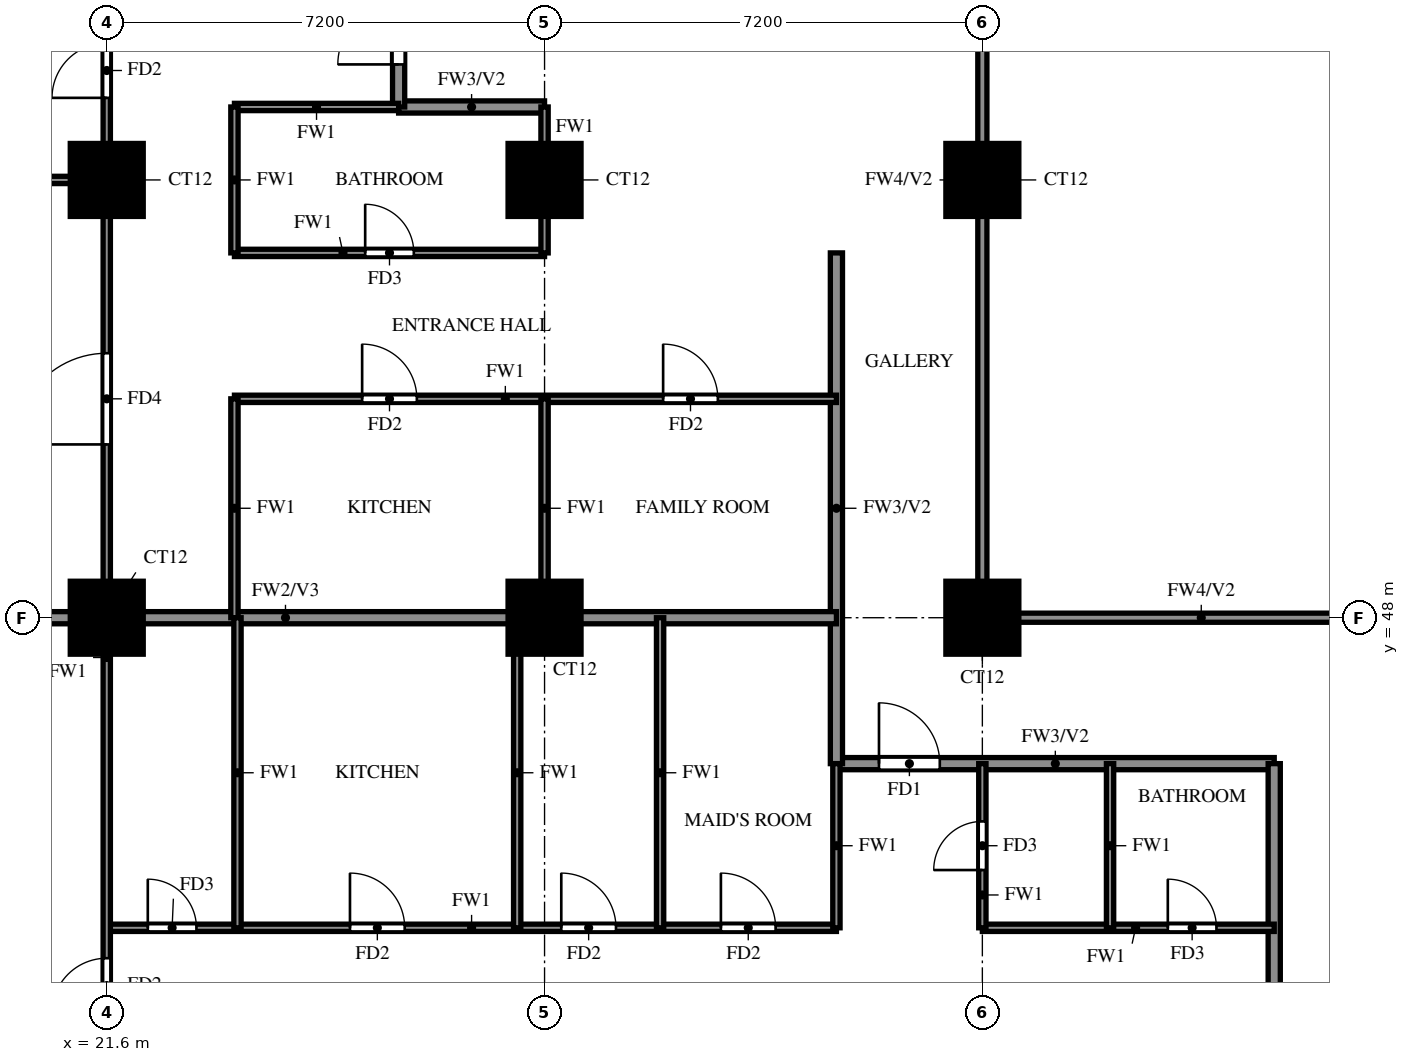
"""IFC4 building model, lengths in metres.
Left out: names, types, materials, properties, quantities, classifications, styles, units other than length and angle.
Written with IfcOpenShell. Run it as: python <this file> out.ifc"""

import sys

from ifc_helpers import new_model, si_unit, direction, frame, frame_2d, origin, origin_2d, place, context, subcontext, project, spatial, rectangle, extrude, source, transform, mapped, element, fill, save


model = new_model("IFC4")
c1 = context("Model", 3, precision=1e-05, world=origin(), true_north=direction((0.0, 1.0)))
c2 = subcontext(c1, "Body", "Model", "MODEL_VIEW")
j1 = project(units=[si_unit("LENGTHUNIT", "METRE"), si_unit("PLANEANGLEUNIT", "RADIAN")], contexts=[c1])
p1 = place(None, origin())
s1 = spatial("IfcSite", under=j1, at=p1, CompositionType="ELEMENT")
p2 = place(p1, origin())
s2 = spatial("IfcBuilding", under=s1, at=p2, CompositionType="ELEMENT")
p3 = place(p2, frame((0.0, 0.0, 97.0)))
s3 = spatial("IfcBuildingStorey", under=s2, at=p3, CompositionType="ELEMENT", Elevation=97.0)
m1 = source(origin(), c2, "Body", "SweptSolid", [
    extrude(rectangle(XDim=1.2, YDim=1.2, at=origin_2d()), origin(), (0.0, 0.0, 1.0), 3.18),
])
for number, where, z_axis, x_axis in (
    (1, (21.6, 48.0, 0.0), (0.0, 0.0, 1.0), (1.0, 0.0, 0.0)),
    (2, (28.8, 48.0, 0.0), (0.0, 0.0, 1.0), (1.0, 0.0, 0.0)),
    (3, (36.0, 48.0, 0.0), (0.0, 0.0, 1.0), (1.0, 0.0, 0.0)),
    (4, (21.6, 55.2, 0.0), (0.0, 0.0, 1.0), (1.0, 0.0, 0.0)),
    (5, (28.8, 55.2, 0.0), (0.0, 0.0, 1.0), (1.0, 0.0, 0.0)),
    (6, (36.0, 55.2, 0.0), (0.0, 0.0, 1.0), (1.0, 0.0, 0.0)),
):
    element("IfcColumn", number, at=place(p3, frame(where, z_axis=z_axis, x_axis=x_axis)), inside=s3, PredefinedType="COLUMN", context=c2, shape_type="MappedRepresentation", body=[
        mapped(m1, transform((0.0, 0.0, 0.0))),
    ])
p4 = place(p3, frame((33.6, 45.6, 0.0), z_axis=(0.0, 0.0, 1.0), x_axis=(1.0, 0.0, 0.0)))
e7 = element("IfcWall", 7, at=p4, inside=s3, PredefinedType="SOLIDWALL", context=c2, shape_type="SweptSolid", body=[
    extrude(rectangle(XDim=7.2, YDim=0.2, at=frame_2d((3.6, 0.0))), origin(), (0.0, 0.0, 1.0), 3.18),
])
p5 = place(p4, frame((0.7, 0.0, 0.0)))
e8 = element("IfcOpeningElement", 8, at=p5, cuts=e7, PredefinedType="OPENING", context=c2, shape_type="SweptSolid", body=[
    extrude(rectangle(XDim=1.0, YDim=2.1, at=frame_2d((0.5, 1.05))), frame((0.0, 0.11, 0.0), z_axis=(0.0, -1.0, 0.0), x_axis=(1.0, 0.0, 0.0)), (0.0, 0.0, 1.0), 0.22),
])
p6 = place(p3, frame((26.4, 56.4, 0.0), z_axis=(0.0, 0.0, 1.0), x_axis=(1.0, 0.0, 0.0)))
e9 = element("IfcWall", 9, at=p6, inside=s3, PredefinedType="SOLIDWALL", context=c2, shape_type="SweptSolid", body=[
    extrude(rectangle(XDim=2.4, YDim=0.2, at=frame_2d((1.2, 0.0))), origin(), (0.0, 0.0, 1.0), 3.18),
])
p7 = place(p3, frame((26.4, 56.4, 0.0), z_axis=(0.0, 0.0, 1.0), x_axis=(0.0, 1.0, 0.0)))
e10 = element("IfcWall", 10, at=p7, inside=s3, PredefinedType="SOLIDWALL", context=c2, shape_type="SweptSolid", body=[
    extrude(rectangle(XDim=9.6, YDim=0.2, at=frame_2d((4.8, 0.0))), origin(), (0.0, 0.0, 1.0), 3.18),
])
p8 = place(p7, frame((0.7, 0.0, 0.0)))
e11 = element("IfcOpeningElement", 11, at=p8, cuts=e10, PredefinedType="OPENING", context=c2, shape_type="SweptSolid", body=[
    extrude(rectangle(XDim=1.0, YDim=2.1, at=frame_2d((0.5, 1.05))), frame((0.0, 0.11, 0.0), z_axis=(0.0, -1.0, 0.0), x_axis=(1.0, 0.0, 0.0)), (0.0, 0.0, 1.0), 0.22),
])
p9 = place(p7, frame((3.1, 0.0, 0.0)))
e12 = element("IfcOpeningElement", 12, at=p9, cuts=e10, PredefinedType="OPENING", context=c2, shape_type="SweptSolid", body=[
    extrude(rectangle(XDim=1.0, YDim=2.1, at=frame_2d((0.5, 1.05))), frame((0.0, 0.11, 0.0), z_axis=(0.0, -1.0, 0.0), x_axis=(1.0, 0.0, 0.0)), (0.0, 0.0, 1.0), 0.22),
])
p10 = place(p3, frame((33.6, 45.6, 0.0), z_axis=(0.0, 0.0, 1.0), x_axis=(0.0, 1.0, 0.0)))
e13 = element("IfcWall", 13, at=p10, inside=s3, PredefinedType="SOLIDWALL", context=c2, shape_type="SweptSolid", body=[
    extrude(rectangle(XDim=8.4, YDim=0.2, at=frame_2d((4.2, 0.0))), origin(), (0.0, 0.0, 1.0), 3.18),
])
p11 = place(p3, frame((40.8, 33.725, 0.0), z_axis=(0.0, 0.0, 1.0), x_axis=(0.0, 1.0, 0.0)))
e14 = element("IfcWall", 14, at=p11, inside=s3, PredefinedType="SOLIDWALL", context=c2, shape_type="SweptSolid", body=[
    extrude(rectangle(XDim=11.875, YDim=0.2, at=frame_2d((5.938, 0.0))), origin(), (0.0, 0.0, 1.0), 2.28),
])
p12 = place(p3, frame((14.525, 48.0, 0.0), z_axis=(0.0, 0.0, 1.0), x_axis=(1.0, 0.0, 0.0)))
e15 = element("IfcWall", 15, at=p12, inside=s3, PredefinedType="SOLIDWALL", context=c2, shape_type="SweptSolid", body=[
    extrude(rectangle(XDim=19.075, YDim=0.2, at=frame_2d((9.538, 0.0))), origin(), (0.0, 0.0, 1.0), 3.18),
])
p13 = place(p3, frame((21.6, 42.9, 0.0), z_axis=(0.0, 0.0, 1.0), x_axis=(1.0, 0.0, 0.0)))
e16 = element("IfcWall", 16, at=p13, inside=s3, PredefinedType="PARTITIONING", context=c2, shape_type="SweptSolid", body=[
    extrude(rectangle(XDim=12.0, YDim=0.12, at=frame_2d((6.0, 0.0))), origin(), (0.0, 0.0, 1.0), 3.18),
])
p14 = place(p13, frame((0.675, 0.0, 0.0)))
e17 = element("IfcOpeningElement", 17, at=p14, cuts=e16, PredefinedType="OPENING", context=c2, shape_type="SweptSolid", body=[
    extrude(rectangle(XDim=0.8, YDim=2.1, at=frame_2d((0.4, 1.05))), frame((0.0, 0.07, 0.0), z_axis=(0.0, -1.0, 0.0), x_axis=(1.0, 0.0, 0.0)), (0.0, 0.0, 1.0), 0.14),
])
p15 = place(p13, frame((4.0, 0.0, 0.0)))
e18 = element("IfcOpeningElement", 18, at=p15, cuts=e16, PredefinedType="OPENING", context=c2, shape_type="SweptSolid", body=[
    extrude(rectangle(XDim=0.9, YDim=2.1, at=frame_2d((0.45, 1.05))), frame((0.0, 0.07, 0.0), z_axis=(0.0, -1.0, 0.0), x_axis=(1.0, 0.0, 0.0)), (0.0, 0.0, 1.0), 0.14),
])
p16 = place(p13, frame((7.475, 0.0, 0.0)))
e19 = element("IfcOpeningElement", 19, at=p16, cuts=e16, PredefinedType="OPENING", context=c2, shape_type="SweptSolid", body=[
    extrude(rectangle(XDim=0.9, YDim=2.1, at=frame_2d((0.45, 1.05))), frame((0.0, 0.07, 0.0), z_axis=(0.0, -1.0, 0.0), x_axis=(1.0, 0.0, 0.0)), (0.0, 0.0, 1.0), 0.14),
])
p17 = place(p13, frame((10.1, 0.0, 0.0)))
e20 = element("IfcOpeningElement", 20, at=p17, cuts=e16, PredefinedType="OPENING", context=c2, shape_type="SweptSolid", body=[
    extrude(rectangle(XDim=0.9, YDim=2.1, at=frame_2d((0.45, 1.05))), frame((0.0, 0.07, 0.0), z_axis=(0.0, -1.0, 0.0), x_axis=(1.0, 0.0, 0.0)), (0.0, 0.0, 1.0), 0.14),
])
p18 = place(p3, frame((36.0, 42.9, 0.0), z_axis=(0.0, 0.0, 1.0), x_axis=(1.0, 0.0, 0.0)))
e21 = element("IfcWall", 21, at=p18, inside=s3, PredefinedType="PARTITIONING", context=c2, shape_type="SweptSolid", body=[
    extrude(rectangle(XDim=4.8, YDim=0.12, at=frame_2d((2.4, 0.0))), origin(), (0.0, 0.0, 1.0), 3.18),
])
p19 = place(p18, frame((3.05, 0.0, 0.0)))
e22 = element("IfcOpeningElement", 22, at=p19, cuts=e21, PredefinedType="OPENING", context=c2, shape_type="SweptSolid", body=[
    extrude(rectangle(XDim=0.8, YDim=2.1, at=frame_2d((0.4, 1.05))), frame((0.0, 0.07, 0.0), z_axis=(0.0, -1.0, 0.0), x_axis=(1.0, 0.0, 0.0)), (0.0, 0.0, 1.0), 0.14),
])
p20 = place(p3, frame((23.7, 51.6, 0.0), z_axis=(0.0, 0.0, 1.0), x_axis=(1.0, 0.0, 0.0)))
e23 = element("IfcWall", 23, at=p20, inside=s3, PredefinedType="PARTITIONING", context=c2, shape_type="SweptSolid", body=[
    extrude(rectangle(XDim=9.9, YDim=0.12, at=frame_2d((4.95, 0.0))), origin(), (0.0, 0.0, 1.0), 3.18),
])
p21 = place(p20, frame((2.1, 0.0, 0.0)))
e24 = element("IfcOpeningElement", 24, at=p21, cuts=e23, PredefinedType="OPENING", context=c2, shape_type="SweptSolid", body=[
    extrude(rectangle(XDim=0.9, YDim=2.1, at=frame_2d((0.45, 1.05))), frame((0.0, 0.07, 0.0), z_axis=(0.0, -1.0, 0.0), x_axis=(1.0, 0.0, 0.0)), (0.0, 0.0, 1.0), 0.14),
])
p22 = place(p20, frame((7.05, 0.0, 0.0)))
e25 = element("IfcOpeningElement", 25, at=p22, cuts=e23, PredefinedType="OPENING", context=c2, shape_type="SweptSolid", body=[
    extrude(rectangle(XDim=0.9, YDim=2.1, at=frame_2d((0.45, 1.05))), frame((0.0, 0.07, 0.0), z_axis=(0.0, -1.0, 0.0), x_axis=(1.0, 0.0, 0.0)), (0.0, 0.0, 1.0), 0.14),
])
p23 = place(p3, frame((23.7, 54.0, 0.0), z_axis=(0.0, 0.0, 1.0), x_axis=(1.0, 0.0, 0.0)))
e26 = element("IfcWall", 26, at=p23, inside=s3, PredefinedType="PARTITIONING", context=c2, shape_type="SweptSolid", body=[
    extrude(rectangle(XDim=5.1, YDim=0.12, at=frame_2d((2.55, 0.0))), origin(), (0.0, 0.0, 1.0), 3.18),
])
p24 = place(p23, frame((2.15, 0.0, 0.0)))
e27 = element("IfcOpeningElement", 27, at=p24, cuts=e26, PredefinedType="OPENING", context=c2, shape_type="SweptSolid", body=[
    extrude(rectangle(XDim=0.8, YDim=2.1, at=frame_2d((0.4, 1.05))), frame((0.0, 0.07, 0.0), z_axis=(0.0, -1.0, 0.0), x_axis=(1.0, 0.0, 0.0)), (0.0, 0.0, 1.0), 0.14),
])
p25 = place(p3, frame((14.525, 55.2, 0.0), z_axis=(0.0, 0.0, 1.0), x_axis=(1.0, 0.0, 0.0)))
e28 = element("IfcWall", 28, at=p25, inside=s3, PredefinedType="PARTITIONING", context=c2, shape_type="SweptSolid", body=[
    extrude(rectangle(XDim=7.075, YDim=0.12, at=frame_2d((3.538, 0.0))), origin(), (0.0, 0.0, 1.0), 3.18),
])
p26 = place(p3, frame((23.7, 56.4, 0.0), z_axis=(0.0, 0.0, 1.0), x_axis=(1.0, 0.0, 0.0)))
e29 = element("IfcWall", 29, at=p26, inside=s3, PredefinedType="PARTITIONING", context=c2, shape_type="SweptSolid", body=[
    extrude(rectangle(XDim=2.7, YDim=0.12, at=frame_2d((1.35, 0.0))), origin(), (0.0, 0.0, 1.0), 3.18),
])
p27 = place(p3, frame((21.6, 33.725, 0.0), z_axis=(0.0, 0.0, 1.0), x_axis=(0.0, 1.0, 0.0)))
e30 = element("IfcWall", 30, at=p27, inside=s3, PredefinedType="PARTITIONING", context=c2, shape_type="SweptSolid", body=[
    extrude(rectangle(XDim=28.675, YDim=0.12, at=frame_2d((14.337, 0.0))), origin(), (0.0, 0.0, 1.0), 3.18),
])
p28 = place(p27, frame((7.775, 0.0, 0.0)))
e31 = element("IfcOpeningElement", 31, at=p28, cuts=e30, PredefinedType="OPENING", context=c2, shape_type="SweptSolid", body=[
    extrude(rectangle(XDim=0.9, YDim=2.1, at=frame_2d((0.45, 1.05))), frame((0.0, 0.07, 0.0), z_axis=(0.0, -1.0, 0.0), x_axis=(1.0, 0.0, 0.0)), (0.0, 0.0, 1.0), 0.14),
])
p29 = place(p27, frame((17.125, 0.0, 0.0)))
e32 = element("IfcOpeningElement", 32, at=p29, cuts=e30, PredefinedType="OPENING", context=c2, shape_type="SweptSolid", body=[
    extrude(rectangle(XDim=1.5, YDim=2.1, at=frame_2d((0.75, 1.05))), frame((0.0, 0.07, 0.0), z_axis=(0.0, -1.0, 0.0), x_axis=(1.0, 0.0, 0.0)), (0.0, 0.0, 1.0), 0.14),
])
p30 = place(p27, frame((22.825, 0.0, 0.0)))
e33 = element("IfcOpeningElement", 33, at=p30, cuts=e30, PredefinedType="OPENING", context=c2, shape_type="SweptSolid", body=[
    extrude(rectangle(XDim=0.9, YDim=2.1, at=frame_2d((0.45, 1.05))), frame((0.0, 0.07, 0.0), z_axis=(0.0, -1.0, 0.0), x_axis=(1.0, 0.0, 0.0)), (0.0, 0.0, 1.0), 0.14),
])
p31 = place(p27, frame((26.425, 0.0, 0.0)))
e34 = element("IfcOpeningElement", 34, at=p31, cuts=e30, PredefinedType="OPENING", context=c2, shape_type="SweptSolid", body=[
    extrude(rectangle(XDim=0.9, YDim=2.1, at=frame_2d((0.45, 1.05))), frame((0.0, 0.07, 0.0), z_axis=(0.0, -1.0, 0.0), x_axis=(1.0, 0.0, 0.0)), (0.0, 0.0, 1.0), 0.14),
])
p32 = place(p3, frame((23.7, 48.0, 0.0), z_axis=(0.0, 0.0, 1.0), x_axis=(0.0, 1.0, 0.0)))
e35 = element("IfcWall", 35, at=p32, inside=s3, PredefinedType="PARTITIONING", context=c2, shape_type="SweptSolid", body=[
    extrude(rectangle(XDim=3.6, YDim=0.12, at=frame_2d((1.8, 0.0))), origin(), (0.0, 0.0, 1.0), 3.18),
])
p33 = place(p3, frame((23.7, 54.0, 0.0), z_axis=(0.0, 0.0, 1.0), x_axis=(0.0, 1.0, 0.0)))
e36 = element("IfcWall", 36, at=p33, inside=s3, PredefinedType="PARTITIONING", context=c2, shape_type="SweptSolid", body=[
    extrude(rectangle(XDim=2.4, YDim=0.12, at=frame_2d((1.2, 0.0))), origin(), (0.0, 0.0, 1.0), 3.18),
])
for number, where, z_axis, x_axis in (
    (37, (23.75, 42.9, 0.0), (0.0, 0.0, 1.0), (0.0, 1.0, 0.0)),
    (38, (28.35, 42.9, 0.0), (0.0, 0.0, 1.0), (0.0, 1.0, 0.0)),
):
    element("IfcWall", number, at=place(p3, frame(where, z_axis=z_axis, x_axis=x_axis)), inside=s3, PredefinedType="PARTITIONING", context=c2, shape_type="SweptSolid", body=[
        extrude(rectangle(XDim=5.1, YDim=0.12, at=frame_2d((2.55, 0.0))), origin(), (0.0, 0.0, 1.0), 3.18),
    ])
p34 = place(p3, frame((28.8, 48.0, 0.0), z_axis=(0.0, 0.0, 1.0), x_axis=(0.0, 1.0, 0.0)))
e39 = element("IfcWall", 39, at=p34, inside=s3, PredefinedType="PARTITIONING", context=c2, shape_type="SweptSolid", body=[
    extrude(rectangle(XDim=3.6, YDim=0.12, at=frame_2d((1.8, 0.0))), origin(), (0.0, 0.0, 1.0), 3.18),
])
p35 = place(p3, frame((28.8, 54.0, 0.0), z_axis=(0.0, 0.0, 1.0), x_axis=(0.0, 1.0, 0.0)))
e40 = element("IfcWall", 40, at=p35, inside=s3, PredefinedType="PARTITIONING", context=c2, shape_type="SweptSolid", body=[
    extrude(rectangle(XDim=2.4, YDim=0.12, at=frame_2d((1.2, 0.0))), origin(), (0.0, 0.0, 1.0), 3.18),
])
p36 = place(p3, frame((30.7, 42.9, 0.0), z_axis=(0.0, 0.0, 1.0), x_axis=(0.0, 1.0, 0.0)))
e41 = element("IfcWall", 41, at=p36, inside=s3, PredefinedType="PARTITIONING", context=c2, shape_type="SweptSolid", body=[
    extrude(rectangle(XDim=5.1, YDim=0.12, at=frame_2d((2.55, 0.0))), origin(), (0.0, 0.0, 1.0), 3.18),
])
p37 = place(p3, frame((33.6, 42.9, 0.0), z_axis=(0.0, 0.0, 1.0), x_axis=(0.0, 1.0, 0.0)))
e42 = element("IfcWall", 42, at=p37, inside=s3, PredefinedType="PARTITIONING", context=c2, shape_type="SweptSolid", body=[
    extrude(rectangle(XDim=2.7, YDim=0.12, at=frame_2d((1.35, 0.0))), origin(), (0.0, 0.0, 1.0), 3.18),
])
p38 = place(p3, frame((36.0, 42.9, 0.0), z_axis=(0.0, 0.0, 1.0), x_axis=(0.0, 1.0, 0.0)))
e43 = element("IfcWall", 43, at=p38, inside=s3, PredefinedType="PARTITIONING", context=c2, shape_type="SweptSolid", body=[
    extrude(rectangle(XDim=2.7, YDim=0.12, at=frame_2d((1.35, 0.0))), origin(), (0.0, 0.0, 1.0), 3.18),
])
p39 = place(p38, frame((0.95, 0.0, 0.0)))
e44 = element("IfcOpeningElement", 44, at=p39, cuts=e43, PredefinedType="OPENING", context=c2, shape_type="SweptSolid", body=[
    extrude(rectangle(XDim=0.8, YDim=2.1, at=frame_2d((0.4, 1.05))), frame((0.0, 0.07, 0.0), z_axis=(0.0, -1.0, 0.0), x_axis=(1.0, 0.0, 0.0)), (0.0, 0.0, 1.0), 0.14),
])
p40 = place(p3, frame((38.1, 42.9, 0.0), z_axis=(0.0, 0.0, 1.0), x_axis=(0.0, 1.0, 0.0)))
e45 = element("IfcWall", 45, at=p40, inside=s3, PredefinedType="PARTITIONING", context=c2, shape_type="SweptSolid", body=[
    extrude(rectangle(XDim=2.7, YDim=0.12, at=frame_2d((1.35, 0.0))), origin(), (0.0, 0.0, 1.0), 3.18),
])
p41 = place(p3, frame((36.0, 48.0, 0.0), z_axis=(0.0, 0.0, 1.0), x_axis=(1.0, 0.0, 0.0)))
e46 = element("IfcWall", 46, at=p41, inside=s3, PredefinedType="SOLIDWALL", context=c2, shape_type="SweptSolid", body=[
    extrude(rectangle(XDim=7.2, YDim=0.15, at=frame_2d((3.6, 0.0))), origin(), (0.0, 0.0, 1.0), 2.28),
])
p42 = place(p3, frame((36.0, 48.0, 0.0), z_axis=(0.0, 0.0, 1.0), x_axis=(0.0, 1.0, 0.0)))
e47 = element("IfcWall", 47, at=p42, inside=s3, PredefinedType="SOLIDWALL", context=c2, shape_type="SweptSolid", body=[
    extrude(rectangle(XDim=14.4, YDim=0.15, at=frame_2d((7.2, 0.0))), origin(), (0.0, 0.0, 1.0), 2.28),
])
p43 = place(p5, origin())
e48 = element("IfcDoor", 48, at=p43, inside=s3, OperationType="SINGLE_SWING_LEFT", PredefinedType="DOOR", context=c2, shape_type="SweptSolid", body=[
    extrude(rectangle(XDim=1.0, YDim=2.1, at=frame_2d((0.5, 1.05))), frame((0.0, 0.025, 0.0), z_axis=(0.0, -1.0, 0.0), x_axis=(1.0, 0.0, 0.0)), (0.0, 0.0, 1.0), 0.05),
])
fill(e8, e48)
p44 = place(p28, origin())
e49 = element("IfcDoor", 49, at=p44, inside=s3, OperationType="SINGLE_SWING_RIGHT", PredefinedType="DOOR", context=c2, shape_type="SweptSolid", body=[
    extrude(rectangle(XDim=0.9, YDim=2.1, at=frame_2d((0.45, 1.05))), frame((0.0, 0.025, 0.0), z_axis=(0.0, -1.0, 0.0), x_axis=(1.0, 0.0, 0.0)), (0.0, 0.0, 1.0), 0.05),
])
fill(e31, e49)
p45 = place(p14, origin())
e50 = element("IfcDoor", 50, at=p45, inside=s3, OperationType="SINGLE_SWING_LEFT", PredefinedType="DOOR", context=c2, shape_type="SweptSolid", body=[
    extrude(rectangle(XDim=0.8, YDim=2.1, at=frame_2d((0.4, 1.05))), frame((0.0, 0.025, 0.0), z_axis=(0.0, -1.0, 0.0), x_axis=(1.0, 0.0, 0.0)), (0.0, 0.0, 1.0), 0.05),
])
fill(e17, e50)
p46 = place(p15, origin())
e51 = element("IfcDoor", 51, at=p46, inside=s3, OperationType="SINGLE_SWING_RIGHT", PredefinedType="DOOR", context=c2, shape_type="SweptSolid", body=[
    extrude(rectangle(XDim=0.9, YDim=2.1, at=frame_2d((0.45, 1.05))), frame((0.0, 0.025, 0.0), z_axis=(0.0, -1.0, 0.0), x_axis=(1.0, 0.0, 0.0)), (0.0, 0.0, 1.0), 0.05),
])
fill(e18, e51)
p47 = place(p16, origin())
e52 = element("IfcDoor", 52, at=p47, inside=s3, OperationType="SINGLE_SWING_LEFT", PredefinedType="DOOR", context=c2, shape_type="SweptSolid", body=[
    extrude(rectangle(XDim=0.9, YDim=2.1, at=frame_2d((0.45, 1.05))), frame((0.0, 0.025, 0.0), z_axis=(0.0, -1.0, 0.0), x_axis=(1.0, 0.0, 0.0)), (0.0, 0.0, 1.0), 0.05),
])
fill(e19, e52)
p48 = place(p17, origin())
e53 = element("IfcDoor", 53, at=p48, inside=s3, OperationType="SINGLE_SWING_LEFT", PredefinedType="DOOR", context=c2, shape_type="SweptSolid", body=[
    extrude(rectangle(XDim=0.9, YDim=2.1, at=frame_2d((0.45, 1.05))), frame((0.0, 0.025, 0.0), z_axis=(0.0, -1.0, 0.0), x_axis=(1.0, 0.0, 0.0)), (0.0, 0.0, 1.0), 0.05),
])
fill(e20, e53)
p49 = place(p39, origin())
e54 = element("IfcDoor", 54, at=p49, inside=s3, OperationType="SINGLE_SWING_RIGHT", PredefinedType="DOOR", context=c2, shape_type="SweptSolid", body=[
    extrude(rectangle(XDim=0.8, YDim=2.1, at=frame_2d((0.4, 1.05))), frame((0.0, 0.025, 0.0), z_axis=(0.0, -1.0, 0.0), x_axis=(1.0, 0.0, 0.0)), (0.0, 0.0, 1.0), 0.05),
])
fill(e44, e54)
p50 = place(p19, origin())
e55 = element("IfcDoor", 55, at=p50, inside=s3, OperationType="SINGLE_SWING_LEFT", PredefinedType="DOOR", context=c2, shape_type="SweptSolid", body=[
    extrude(rectangle(XDim=0.8, YDim=2.1, at=frame_2d((0.4, 1.05))), frame((0.0, 0.025, 0.0), z_axis=(0.0, -1.0, 0.0), x_axis=(1.0, 0.0, 0.0)), (0.0, 0.0, 1.0), 0.05),
])
fill(e22, e55)
p51 = place(p8, origin())
e56 = element("IfcDoor", 56, at=p51, inside=s3, OperationType="SINGLE_SWING_LEFT", PredefinedType="DOOR", context=c2, shape_type="SweptSolid", body=[
    extrude(rectangle(XDim=1.0, YDim=2.1, at=frame_2d((0.5, 1.05))), frame((0.0, 0.025, 0.0), z_axis=(0.0, -1.0, 0.0), x_axis=(1.0, 0.0, 0.0)), (0.0, 0.0, 1.0), 0.05),
])
fill(e11, e56)
p52 = place(p29, origin())
e57 = element("IfcDoor", 57, at=p52, inside=s3, OperationType="SINGLE_SWING_RIGHT", PredefinedType="DOOR", context=c2, shape_type="SweptSolid", body=[
    extrude(rectangle(XDim=1.5, YDim=2.1, at=frame_2d((0.75, 1.05))), frame((0.0, 0.025, 0.0), z_axis=(0.0, -1.0, 0.0), x_axis=(1.0, 0.0, 0.0)), (0.0, 0.0, 1.0), 0.05),
])
fill(e32, e57)
p53 = place(p30, origin())
e58 = element("IfcDoor", 58, at=p53, inside=s3, OperationType="SINGLE_SWING_LEFT", PredefinedType="DOOR", context=c2, shape_type="SweptSolid", body=[
    extrude(rectangle(XDim=0.9, YDim=2.1, at=frame_2d((0.45, 1.05))), frame((0.0, 0.025, 0.0), z_axis=(0.0, -1.0, 0.0), x_axis=(1.0, 0.0, 0.0)), (0.0, 0.0, 1.0), 0.05),
])
fill(e33, e58)
p54 = place(p21, origin())
e59 = element("IfcDoor", 59, at=p54, inside=s3, OperationType="SINGLE_SWING_LEFT", PredefinedType="DOOR", context=c2, shape_type="SweptSolid", body=[
    extrude(rectangle(XDim=0.9, YDim=2.1, at=frame_2d((0.45, 1.05))), frame((0.0, 0.025, 0.0), z_axis=(0.0, -1.0, 0.0), x_axis=(1.0, 0.0, 0.0)), (0.0, 0.0, 1.0), 0.05),
])
fill(e24, e59)
p55 = place(p24, origin())
e60 = element("IfcDoor", 60, at=p55, inside=s3, OperationType="SINGLE_SWING_RIGHT", PredefinedType="DOOR", context=c2, shape_type="SweptSolid", body=[
    extrude(rectangle(XDim=0.8, YDim=2.1, at=frame_2d((0.4, 1.05))), frame((0.0, 0.025, 0.0), z_axis=(0.0, -1.0, 0.0), x_axis=(1.0, 0.0, 0.0)), (0.0, 0.0, 1.0), 0.05),
])
fill(e27, e60)
p56 = place(p22, origin())
e61 = element("IfcDoor", 61, at=p56, inside=s3, OperationType="SINGLE_SWING_LEFT", PredefinedType="DOOR", context=c2, shape_type="SweptSolid", body=[
    extrude(rectangle(XDim=0.9, YDim=2.1, at=frame_2d((0.45, 1.05))), frame((0.0, 0.025, 0.0), z_axis=(0.0, -1.0, 0.0), x_axis=(1.0, 0.0, 0.0)), (0.0, 0.0, 1.0), 0.05),
])
fill(e25, e61)
save(model, sys.argv[1])
